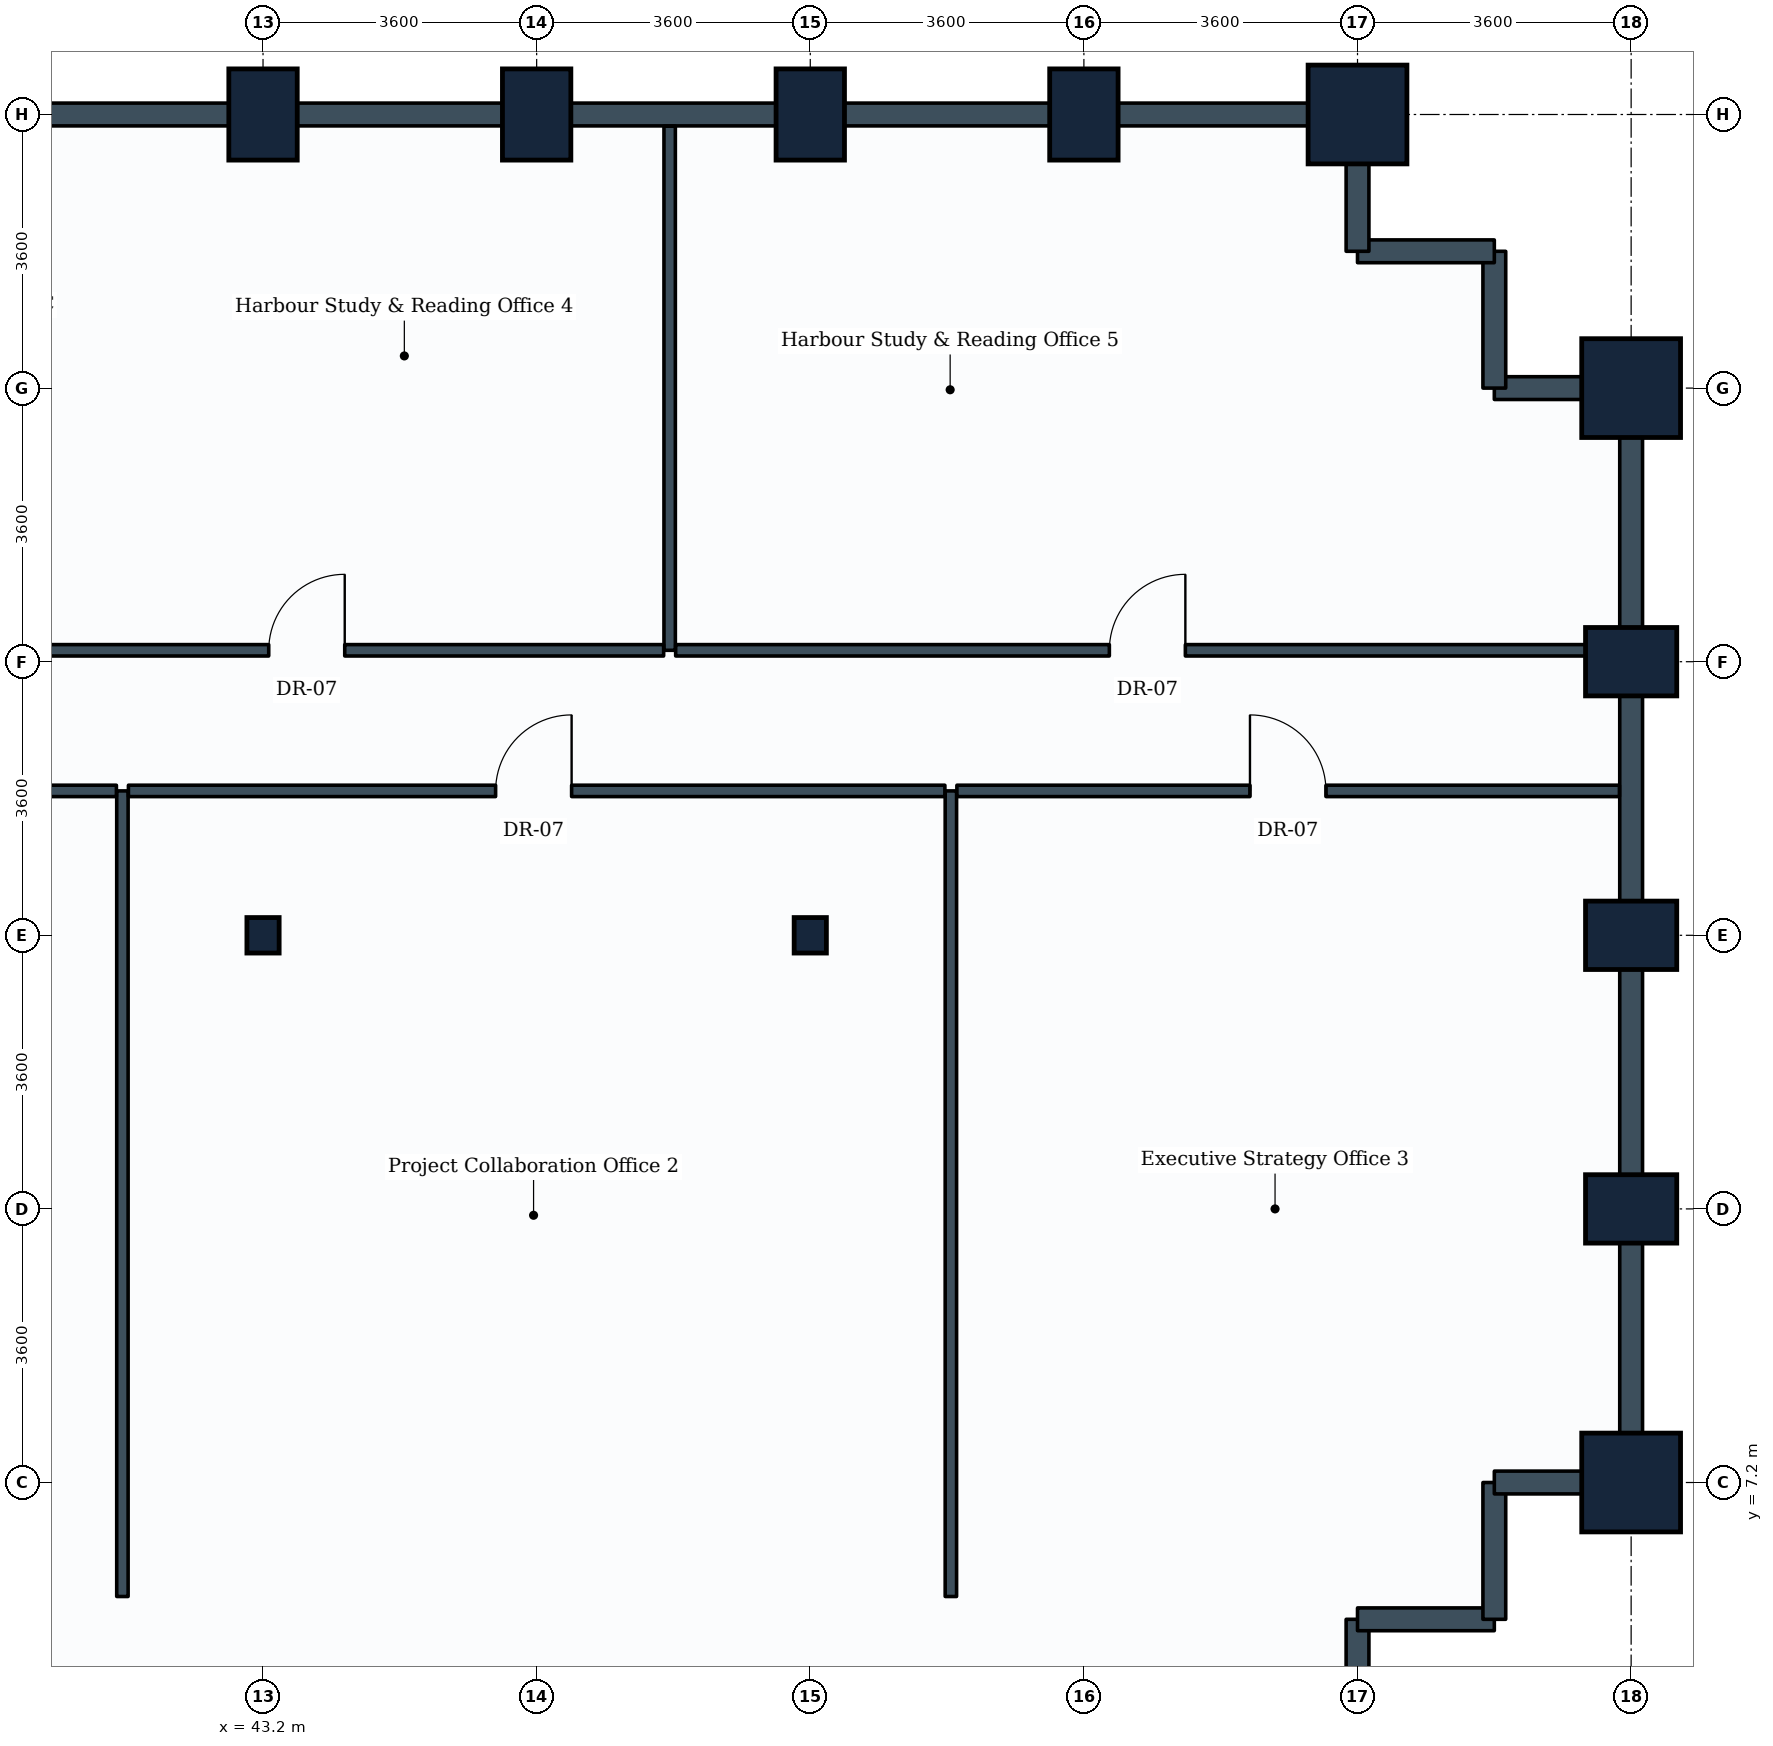
"""IFC4 building model, lengths in metres.
Left out: names, types, materials, properties, quantities, classifications, styles, units other than length and angle.
Written with IfcOpenShell. Run it as: python <this file> out.ifc"""

import sys

from ifc_helpers import new_model, si_unit, direction, frame, frame_2d, origin, origin_2d, place, context, subcontext, project, spatial, rectangle, i_section, extrude, element, fill, save


model = new_model("IFC4")
c1 = context("Model", 3, precision=1e-05, world=origin(), true_north=direction((0.0, 1.0)))
c2 = subcontext(c1, "Body", "Model", "MODEL_VIEW")
j1 = project(units=[si_unit("LENGTHUNIT", "METRE"), si_unit("PLANEANGLEUNIT", "RADIAN")], contexts=[c1])
p1 = place(None, origin())
s1 = spatial("IfcSite", under=j1, at=p1, CompositionType="ELEMENT")
p2 = place(p1, origin())
s2 = spatial("IfcBuilding", under=s1, at=p2, CompositionType="ELEMENT")
p3 = place(p2, frame((0.0, 0.0, 59.1)))
s3 = spatial("IfcBuildingStorey", under=s2, at=p3, CompositionType="ELEMENT", Elevation=59.1)
p4 = place(p3, frame((43.2, 14.4, 0.0), z_axis=(0.0, 0.0, 1.0), x_axis=(1.0, 0.0, 0.0)))
e1 = element("IfcColumn", 1, at=p4, inside=s3, PredefinedType="COLUMN", context=c2, shape_type="SweptSolid", body=[
    extrude(i_section(OverallWidth=0.424, OverallDepth=0.467, WebThickness=0.033, FlangeThickness=0.053, FilletRadius=0.015, at=origin_2d()), origin(), (0.0, 0.0, 1.0), 3.9),
])
for number, where, z_axis, x_axis in (
    (2, (43.2, 25.2, 0.0), (0.0, 0.0, 1.0), (1.0, 0.0, 0.0)),
    (3, (46.8, 25.2, 0.0), (0.0, 0.0, 1.0), (1.0, 0.0, 0.0)),
):
    element("IfcColumn", number, at=place(p3, frame(where, z_axis=z_axis, x_axis=x_axis)), inside=s3, PredefinedType="COLUMN", context=c2, shape_type="SweptSolid", body=[
        extrude(rectangle(XDim=0.9, YDim=1.2, at=origin_2d()), origin(), (0.0, 0.0, 1.0), 3.9),
    ])
p5 = place(p3, frame((50.4, 14.4, 0.0), z_axis=(0.0, 0.0, 1.0), x_axis=(1.0, 0.0, 0.0)))
e4 = element("IfcColumn", 4, at=p5, inside=s3, PredefinedType="COLUMN", context=c2, shape_type="SweptSolid", body=[
    extrude(i_section(OverallWidth=0.424, OverallDepth=0.467, WebThickness=0.033, FlangeThickness=0.053, FilletRadius=0.015, at=origin_2d()), origin(), (0.0, 0.0, 1.0), 3.9),
])
for number, where, z_axis, x_axis in (
    (5, (50.4, 25.2, 0.0), (0.0, 0.0, 1.0), (1.0, 0.0, 0.0)),
    (6, (54.0, 25.2, 0.0), (0.0, 0.0, 1.0), (1.0, 0.0, 0.0)),
):
    element("IfcColumn", number, at=place(p3, frame(where, z_axis=z_axis, x_axis=x_axis)), inside=s3, PredefinedType="COLUMN", context=c2, shape_type="SweptSolid", body=[
        extrude(rectangle(XDim=0.9, YDim=1.2, at=origin_2d()), origin(), (0.0, 0.0, 1.0), 3.9),
    ])
for number, where, z_axis, x_axis in (
    (7, (57.6, 25.2, 0.0), (0.0, 0.0, 1.0), (1.0, 0.0, 0.0)),
    (8, (61.2, 7.2, 0.0), (0.0, 0.0, 1.0), (1.0, 0.0, 0.0)),
):
    element("IfcColumn", number, at=place(p3, frame(where, z_axis=z_axis, x_axis=x_axis)), inside=s3, PredefinedType="COLUMN", context=c2, shape_type="SweptSolid", body=[
        extrude(rectangle(XDim=1.3, YDim=1.3, at=origin_2d()), origin(), (0.0, 0.0, 1.0), 3.9),
    ])
for number, where, z_axis, x_axis in (
    (9, (61.2, 10.8, 0.0), (0.0, 0.0, 1.0), (0.0, 1.0, 0.0)),
    (10, (61.2, 14.4, 0.0), (0.0, 0.0, 1.0), (0.0, 1.0, 0.0)),
    (11, (61.2, 18.0, 0.0), (0.0, 0.0, 1.0), (0.0, 1.0, 0.0)),
):
    element("IfcColumn", number, at=place(p3, frame(where, z_axis=z_axis, x_axis=x_axis)), inside=s3, PredefinedType="COLUMN", context=c2, shape_type="SweptSolid", body=[
        extrude(rectangle(XDim=0.9, YDim=1.2, at=origin_2d()), origin(), (0.0, 0.0, 1.0), 3.9),
    ])
p6 = place(p3, frame((61.2, 21.6, 0.0), z_axis=(0.0, 0.0, 1.0), x_axis=(0.0, 1.0, 0.0)))
e12 = element("IfcColumn", 12, at=p6, inside=s3, PredefinedType="COLUMN", context=c2, shape_type="SweptSolid", body=[
    extrude(rectangle(XDim=1.3, YDim=1.3, at=origin_2d()), origin(), (0.0, 0.0, 1.0), 3.9),
])
p7 = place(p3, frame((57.6, 5.4, 0.0), z_axis=(0.0, 0.0, 1.0), x_axis=(0.0, -1.0, 0.0)))
e13 = element("IfcWall", 13, at=p7, inside=s3, PredefinedType="STANDARD", context=c2, shape_type="SweptSolid", body=[
    extrude(rectangle(XDim=1.8, YDim=0.3, at=frame_2d((0.9, 0.0))), origin(), (0.0, 0.0, 1.0), 2.93),
])
p8 = place(p3, frame((59.4, 5.4, 0.0), z_axis=(0.0, 0.0, 1.0), x_axis=(-1.0, 0.0, 0.0)))
e14 = element("IfcWall", 14, at=p8, inside=s3, PredefinedType="STANDARD", context=c2, shape_type="SweptSolid", body=[
    extrude(rectangle(XDim=1.8, YDim=0.3, at=frame_2d((0.9, 0.0))), origin(), (0.0, 0.0, 1.0), 3.635),
])
p9 = place(p3, frame((59.4, 7.2, 0.0), z_axis=(0.0, 0.0, 1.0), x_axis=(0.0, -1.0, 0.0)))
e15 = element("IfcWall", 15, at=p9, inside=s3, PredefinedType="STANDARD", context=c2, shape_type="SweptSolid", body=[
    extrude(rectangle(XDim=1.8, YDim=0.3, at=frame_2d((0.9, 0.0))), origin(), (0.0, 0.0, 1.0), 3.635),
])
p10 = place(p3, frame((61.2, 7.2, 0.0), z_axis=(0.0, 0.0, 1.0), x_axis=(-1.0, 0.0, 0.0)))
e16 = element("IfcWall", 16, at=p10, inside=s3, PredefinedType="STANDARD", context=c2, shape_type="SweptSolid", body=[
    extrude(rectangle(XDim=1.8, YDim=0.3, at=frame_2d((0.9, 0.0))), origin(), (0.0, 0.0, 1.0), 2.93),
])
p11 = place(p3, frame((61.2, 10.8, 0.0), z_axis=(0.0, 0.0, 1.0), x_axis=(0.0, -1.0, 0.0)))
e17 = element("IfcWall", 17, at=p11, inside=s3, PredefinedType="STANDARD", context=c2, shape_type="SweptSolid", body=[
    extrude(rectangle(XDim=3.6, YDim=0.3, at=frame_2d((1.8, 0.0))), origin(), (0.0, 0.0, 1.0), 2.93),
])
p12 = place(p3, frame((61.2, 14.4, 0.0), z_axis=(0.0, 0.0, 1.0), x_axis=(0.0, -1.0, 0.0)))
e18 = element("IfcWall", 18, at=p12, inside=s3, PredefinedType="STANDARD", context=c2, shape_type="SweptSolid", body=[
    extrude(rectangle(XDim=3.6, YDim=0.3, at=frame_2d((1.8, 0.0))), origin(), (0.0, 0.0, 1.0), 2.93),
])
for number, where, z_axis, x_axis in (
    (19, (61.2, 18.0, 0.0), (0.0, 0.0, 1.0), (0.0, -1.0, 0.0)),
    (20, (61.2, 21.6, 0.0), (0.0, 0.0, 1.0), (0.0, -1.0, 0.0)),
):
    element("IfcWall", number, at=place(p3, frame(where, z_axis=z_axis, x_axis=x_axis)), inside=s3, PredefinedType="STANDARD", context=c2, shape_type="SweptSolid", body=[
        extrude(rectangle(XDim=3.6, YDim=0.3, at=frame_2d((1.8, 0.0))), origin(), (0.0, 0.0, 1.0), 2.93),
    ])
p13 = place(p3, frame((61.2, 21.6, 0.0), z_axis=(0.0, 0.0, 1.0), x_axis=(-1.0, 0.0, 0.0)))
e21 = element("IfcWall", 21, at=p13, inside=s3, PredefinedType="STANDARD", context=c2, shape_type="SweptSolid", body=[
    extrude(rectangle(XDim=1.8, YDim=0.3, at=frame_2d((0.9, 0.0))), origin(), (0.0, 0.0, 1.0), 2.93),
])
for number, where, z_axis, x_axis in (
    (22, (59.4, 23.4, 0.0), (0.0, 0.0, 1.0), (0.0, -1.0, 0.0)),
    (23, (57.6, 23.4, 0.0), (0.0, 0.0, 1.0), (1.0, 0.0, 0.0)),
):
    element("IfcWall", number, at=place(p3, frame(where, z_axis=z_axis, x_axis=x_axis)), inside=s3, PredefinedType="STANDARD", context=c2, shape_type="SweptSolid", body=[
        extrude(rectangle(XDim=1.8, YDim=0.3, at=frame_2d((0.9, 0.0))), origin(), (0.0, 0.0, 1.0), 3.635),
    ])
p14 = place(p3, frame((57.6, 25.2, 0.0), z_axis=(0.0, 0.0, 1.0), x_axis=(0.0, -1.0, 0.0)))
e24 = element("IfcWall", 24, at=p14, inside=s3, PredefinedType="STANDARD", context=c2, shape_type="SweptSolid", body=[
    extrude(rectangle(XDim=1.8, YDim=0.3, at=frame_2d((0.9, 0.0))), origin(), (0.0, 0.0, 1.0), 2.93),
])
for number, where, z_axis, x_axis in (
    (25, (54.0, 25.2, 0.0), (0.0, 0.0, 1.0), (1.0, 0.0, 0.0)),
    (26, (50.4, 25.2, 0.0), (0.0, 0.0, 1.0), (1.0, 0.0, 0.0)),
):
    element("IfcWall", number, at=place(p3, frame(where, z_axis=z_axis, x_axis=x_axis)), inside=s3, PredefinedType="STANDARD", context=c2, shape_type="SweptSolid", body=[
        extrude(rectangle(XDim=3.6, YDim=0.3, at=frame_2d((1.8, 0.0))), origin(), (0.0, 0.0, 1.0), 2.93),
    ])
p15 = place(p3, frame((46.8, 25.2, 0.0), z_axis=(0.0, 0.0, 1.0), x_axis=(1.0, 0.0, 0.0)))
e27 = element("IfcWall", 27, at=p15, inside=s3, PredefinedType="STANDARD", context=c2, shape_type="SweptSolid", body=[
    extrude(rectangle(XDim=3.6, YDim=0.3, at=frame_2d((1.8, 0.0))), origin(), (0.0, 0.0, 1.0), 2.93),
])
p16 = place(p3, frame((43.2, 25.2, 0.0), z_axis=(0.0, 0.0, 1.0), x_axis=(1.0, 0.0, 0.0)))
e28 = element("IfcWall", 28, at=p16, inside=s3, PredefinedType="STANDARD", context=c2, shape_type="SweptSolid", body=[
    extrude(rectangle(XDim=3.6, YDim=0.3, at=frame_2d((1.8, 0.0))), origin(), (0.0, 0.0, 1.0), 2.93),
])
p17 = place(p3, frame((39.6, 25.2, 0.0), z_axis=(0.0, 0.0, 1.0), x_axis=(1.0, 0.0, 0.0)))
e29 = element("IfcWall", 29, at=p17, inside=s3, PredefinedType="STANDARD", context=c2, shape_type="SweptSolid", body=[
    extrude(rectangle(XDim=3.6, YDim=0.3, at=frame_2d((1.8, 0.0))), origin(), (0.0, 0.0, 1.0), 2.93),
])
p18 = place(p3, frame((41.35, 5.7, 0.0), z_axis=(0.0, 0.0, 1.0), x_axis=(0.0, 1.0, 0.0)))
e30 = element("IfcWall", 30, at=p18, inside=s3, PredefinedType="PARTITIONING", context=c2, shape_type="SweptSolid", body=[
    extrude(rectangle(XDim=10.6, YDim=0.15, at=frame_2d((5.3, 0.0))), origin(), (0.0, 0.0, 1.0), 3.03),
])
p19 = place(p3, frame((34.479, 16.3, 0.0), z_axis=(0.0, 0.0, 1.0), x_axis=(1.0, 0.0, 0.0)))
e31 = element("IfcWall", 31, at=p19, inside=s3, PredefinedType="PARTITIONING", context=c2, shape_type="SweptSolid", body=[
    extrude(rectangle(XDim=6.792, YDim=0.15, at=frame_2d((3.396, 0.0))), origin(), (0.0, 0.0, 1.0), 3.04),
])
p20 = place(p19, frame((2.896, 0.0, 0.0)))
e32 = element("IfcOpeningElement", 32, at=p20, cuts=e31, PredefinedType="OPENING", context=c2, shape_type="SweptSolid", body=[
    extrude(rectangle(XDim=1.0, YDim=2.1, at=frame_2d((0.5, 1.05))), frame((0.0, 0.085, 0.0), z_axis=(0.0, -1.0, 0.0), x_axis=(1.0, 0.0, 0.0)), (0.0, 0.0, 1.0), 0.17),
])
p21 = place(p3, frame((52.25, 5.7, 0.0), z_axis=(0.0, 0.0, 1.0), x_axis=(0.0, 1.0, 0.0)))
e33 = element("IfcWall", 33, at=p21, inside=s3, PredefinedType="PARTITIONING", context=c2, shape_type="SweptSolid", body=[
    extrude(rectangle(XDim=10.6, YDim=0.15, at=frame_2d((5.3, 0.0))), origin(), (0.0, 0.0, 1.0), 3.03),
])
p22 = place(p3, frame((41.429, 16.3, 0.0), z_axis=(0.0, 0.0, 1.0), x_axis=(1.0, 0.0, 0.0)))
e34 = element("IfcWall", 34, at=p22, inside=s3, PredefinedType="PARTITIONING", context=c2, shape_type="SweptSolid", body=[
    extrude(rectangle(XDim=10.742, YDim=0.15, at=frame_2d((5.371, 0.0))), origin(), (0.0, 0.0, 1.0), 3.04),
])
p23 = place(p22, frame((4.831, 0.0, 0.0)))
e35 = element("IfcOpeningElement", 35, at=p23, cuts=e34, PredefinedType="OPENING", context=c2, shape_type="SweptSolid", body=[
    extrude(rectangle(XDim=1.0, YDim=2.1, at=frame_2d((0.5, 1.05))), frame((0.0, 0.085, 0.0), z_axis=(0.0, -1.0, 0.0), x_axis=(1.0, 0.0, 0.0)), (0.0, 0.0, 1.0), 0.17),
])
p24 = place(p3, frame((52.329, 16.3, 0.0), z_axis=(0.0, 0.0, 1.0), x_axis=(1.0, 0.0, 0.0)))
e36 = element("IfcWall", 36, at=p24, inside=s3, PredefinedType="PARTITIONING", context=c2, shape_type="SweptSolid", body=[
    extrude(rectangle(XDim=8.717, YDim=0.15, at=frame_2d((4.358, 0.0))), origin(), (0.0, 0.0, 1.0), 2.93),
])
p25 = place(p24, frame((3.856, 0.0, 0.0)))
e37 = element("IfcOpeningElement", 37, at=p25, cuts=e36, PredefinedType="OPENING", context=c2, shape_type="SweptSolid", body=[
    extrude(rectangle(XDim=1.0, YDim=2.1, at=frame_2d((0.5, 1.05))), frame((0.0, 0.085, 0.0), z_axis=(0.0, -1.0, 0.0), x_axis=(1.0, 0.0, 0.0)), (0.0, 0.0, 1.0), 0.17),
])
p26 = place(p3, frame((48.55, 18.15, 0.0), z_axis=(0.0, 0.0, 1.0), x_axis=(0.0, 1.0, 0.0)))
e38 = element("IfcWall", 38, at=p26, inside=s3, PredefinedType="PARTITIONING", context=c2, shape_type="SweptSolid", body=[
    extrude(rectangle(XDim=6.896, YDim=0.15, at=frame_2d((3.448, 0.0))), origin(), (0.0, 0.0, 1.0), 2.93),
])
p27 = place(p3, frame((39.0, 18.15, 0.0), z_axis=(0.0, 0.0, 1.0), x_axis=(1.0, 0.0, 0.0)))
e39 = element("IfcWall", 39, at=p27, inside=s3, PredefinedType="PARTITIONING", context=c2, shape_type="SweptSolid", body=[
    extrude(rectangle(XDim=9.471, YDim=0.15, at=frame_2d((4.735, 0.0))), origin(), (0.0, 0.0, 1.0), 3.03),
])
p28 = place(p27, frame((4.275, 0.0, 0.0)))
e40 = element("IfcOpeningElement", 40, at=p28, cuts=e39, PredefinedType="OPENING", context=c2, shape_type="SweptSolid", body=[
    extrude(rectangle(XDim=1.0, YDim=2.1, at=frame_2d((0.5, 1.05))), frame((0.0, 0.085, 0.0), z_axis=(0.0, -1.0, 0.0), x_axis=(1.0, 0.0, 0.0)), (0.0, 0.0, 1.0), 0.17),
])
p29 = place(p3, frame((48.629, 18.15, 0.0), z_axis=(0.0, 0.0, 1.0), x_axis=(1.0, 0.0, 0.0)))
e41 = element("IfcWall", 41, at=p29, inside=s3, PredefinedType="PARTITIONING", context=c2, shape_type="SweptSolid", body=[
    extrude(rectangle(XDim=12.417, YDim=0.15, at=frame_2d((6.208, 0.0))), origin(), (0.0, 0.0, 1.0), 2.93),
])
p30 = place(p29, frame((5.706, 0.0, 0.0)))
e42 = element("IfcOpeningElement", 42, at=p30, cuts=e41, PredefinedType="OPENING", context=c2, shape_type="SweptSolid", body=[
    extrude(rectangle(XDim=1.0, YDim=2.1, at=frame_2d((0.5, 1.05))), frame((0.0, 0.085, 0.0), z_axis=(0.0, -1.0, 0.0), x_axis=(1.0, 0.0, 0.0)), (0.0, 0.0, 1.0), 0.17),
])
p31 = place(p23, origin())
e43 = element("IfcDoor", 43, at=p31, inside=s3, OperationType="SINGLE_SWING_RIGHT", PredefinedType="DOOR", context=c2, shape_type="SweptSolid", body=[
    extrude(rectangle(XDim=1.0, YDim=2.1, at=frame_2d((0.5, 1.05))), frame((0.0, 0.025, 0.0), z_axis=(0.0, -1.0, 0.0), x_axis=(1.0, 0.0, 0.0)), (0.0, 0.0, 1.0), 0.05),
])
fill(e35, e43)
p32 = place(p25, origin())
e44 = element("IfcDoor", 44, at=p32, inside=s3, OperationType="SINGLE_SWING_LEFT", PredefinedType="DOOR", context=c2, shape_type="SweptSolid", body=[
    extrude(rectangle(XDim=1.0, YDim=2.1, at=frame_2d((0.5, 1.05))), frame((0.0, 0.025, 0.0), z_axis=(0.0, -1.0, 0.0), x_axis=(1.0, 0.0, 0.0)), (0.0, 0.0, 1.0), 0.05),
])
fill(e37, e44)
p33 = place(p28, origin())
e45 = element("IfcDoor", 45, at=p33, inside=s3, OperationType="SINGLE_SWING_RIGHT", PredefinedType="DOOR", context=c2, shape_type="SweptSolid", body=[
    extrude(rectangle(XDim=1.0, YDim=2.1, at=frame_2d((0.5, 1.05))), frame((0.0, 0.025, 0.0), z_axis=(0.0, -1.0, 0.0), x_axis=(1.0, 0.0, 0.0)), (0.0, 0.0, 1.0), 0.05),
])
fill(e40, e45)
p34 = place(p30, origin())
e46 = element("IfcDoor", 46, at=p34, inside=s3, OperationType="SINGLE_SWING_RIGHT", PredefinedType="DOOR", context=c2, shape_type="SweptSolid", body=[
    extrude(rectangle(XDim=1.0, YDim=2.1, at=frame_2d((0.5, 1.05))), frame((0.0, 0.025, 0.0), z_axis=(0.0, -1.0, 0.0), x_axis=(1.0, 0.0, 0.0)), (0.0, 0.0, 1.0), 0.05),
])
fill(e42, e46)
save(model, sys.argv[1])
